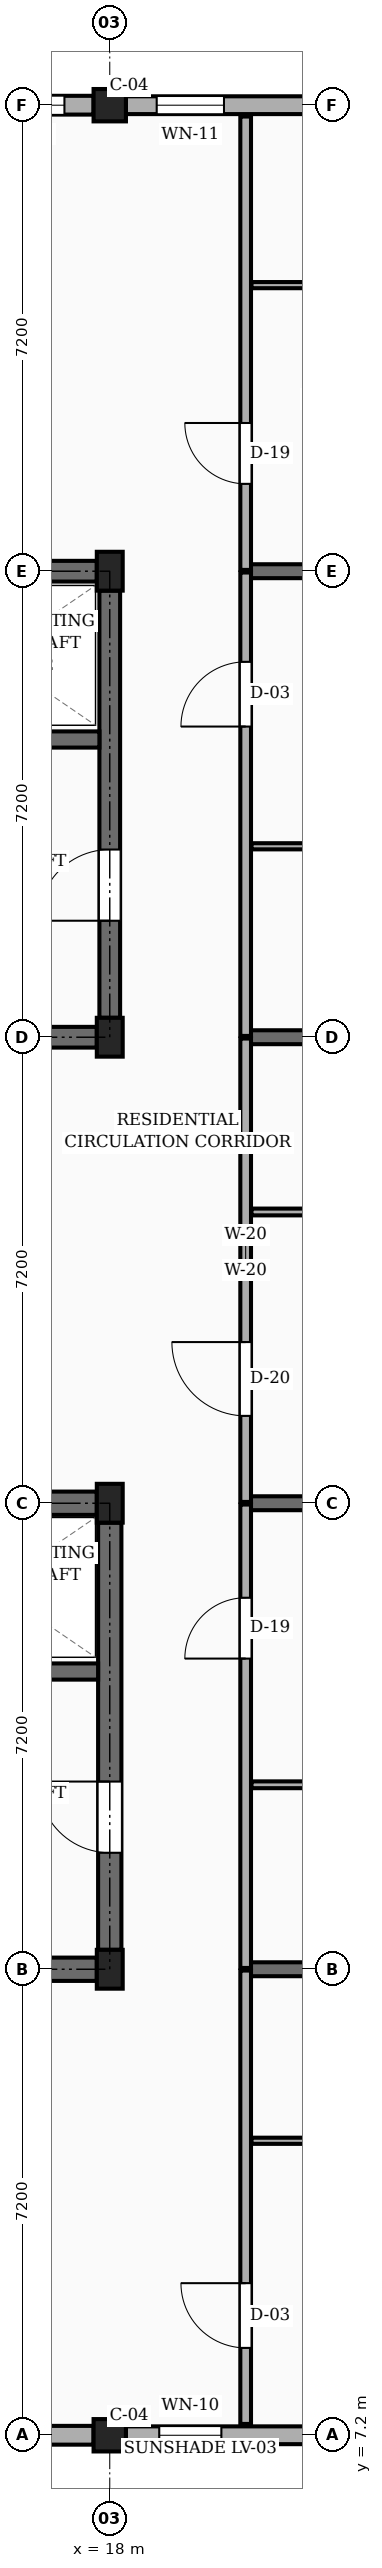
"""IFC4 building model, lengths in metres.
Left out: names, types, materials, properties, quantities, classifications, styles, units other than length and angle.
Written with IfcOpenShell. Run it as: python <this file> out.ifc"""

import sys

from ifc_helpers import new_model, si_unit, direction, frame, frame_2d, origin, origin_2d, place, context, subcontext, project, spatial, rectangle, extrude, element, fill, save


model = new_model("IFC4")
c1 = context("Model", 3, precision=1e-05, world=origin(), true_north=direction((0.0, 1.0)))
c2 = subcontext(c1, "Body", "Model", "MODEL_VIEW")
j1 = project(units=[si_unit("LENGTHUNIT", "METRE"), si_unit("PLANEANGLEUNIT", "RADIAN")], contexts=[c1])
p1 = place(None, origin())
s1 = spatial("IfcSite", under=j1, at=p1, CompositionType="ELEMENT")
p2 = place(p1, origin())
s2 = spatial("IfcBuilding", under=s1, at=p2, CompositionType="ELEMENT")
p3 = place(p2, frame((0.0, 0.0, 29.7)))
s3 = spatial("IfcBuildingStorey", under=s2, at=p3, CompositionType="ELEMENT", Elevation=29.7)
p4 = place(p3, frame((18.0, 7.2, 0.0), z_axis=(0.0, 0.0, 1.0), x_axis=(1.0, 0.0, 0.0)))
e1 = element("IfcColumn", 1, at=p4, inside=s3, PredefinedType="COLUMN", context=c2, shape_type="SweptSolid", body=[
    extrude(rectangle(XDim=0.5, YDim=0.5, at=origin_2d()), origin(), (0.0, 0.0, 1.0), 3.15),
])
for number, where, z_axis, x_axis in (
    (2, (18.0, 14.4, 0.0), (0.0, 0.0, 1.0), (1.0, 0.0, 0.0)),
    (3, (18.0, 21.6, 0.0), (0.0, 0.0, 1.0), (1.0, 0.0, 0.0)),
    (4, (18.0, 28.8, 0.0), (0.0, 0.0, 1.0), (1.0, 0.0, 0.0)),
    (5, (18.0, 36.0, 0.0), (0.0, 0.0, 1.0), (1.0, 0.0, 0.0)),
):
    element("IfcColumn", number, at=place(p3, frame(where, z_axis=z_axis, x_axis=x_axis)), inside=s3, PredefinedType="COLUMN", context=c2, shape_type="SweptSolid", body=[
        extrude(rectangle(XDim=0.4, YDim=0.6, at=origin_2d()), origin(), (0.0, 0.0, 1.0), 3.15),
    ])
p5 = place(p3, frame((18.0, 43.2, 0.0), z_axis=(0.0, 0.0, 1.0), x_axis=(1.0, 0.0, 0.0)))
e6 = element("IfcColumn", 6, at=p5, inside=s3, PredefinedType="COLUMN", context=c2, shape_type="SweptSolid", body=[
    extrude(rectangle(XDim=0.5, YDim=0.5, at=origin_2d()), origin(), (0.0, 0.0, 1.0), 3.15),
])
for number, where, z_axis, x_axis in (
    (7, (20.1, 14.4, 0.0), (0.0, 0.0, 1.0), (1.0, 0.0, 0.0)),
    (8, (20.1, 21.6, 0.0), (0.0, 0.0, 1.0), (1.0, 0.0, 0.0)),
    (9, (20.1, 28.8, 0.0), (0.0, 0.0, 1.0), (1.0, 0.0, 0.0)),
    (10, (20.1, 36.0, 0.0), (0.0, 0.0, 1.0), (1.0, 0.0, 0.0)),
):
    element("IfcWall", number, at=place(p3, frame(where, z_axis=z_axis, x_axis=x_axis)), inside=s3, PredefinedType="SOLIDWALL", context=c2, shape_type="SweptSolid", body=[
        extrude(rectangle(XDim=12.05, YDim=0.215, at=frame_2d((6.025, 0.0))), origin(), (0.0, 0.0, 1.0), 2.17),
    ])
p6 = place(p3, frame((11.05, 7.2, 0.0), z_axis=(0.0, 0.0, 1.0), x_axis=(1.0, 0.0, 0.0)))
e11 = element("IfcWall", 11, at=p6, inside=s3, PredefinedType="SOLIDWALL", context=c2, shape_type="SweptSolid", body=[
    extrude(rectangle(XDim=6.7, YDim=0.29, at=frame_2d((3.35, 0.0))), origin(), (0.0, 0.0, 1.0), 2.44),
])
p7 = place(p6, frame((0.45, 0.0, 0.78)))
e12 = element("IfcOpeningElement", 12, at=p7, cuts=e11, PredefinedType="OPENING", context=c2, shape_type="SweptSolid", body=[
    extrude(rectangle(XDim=1.4, YDim=1.15, at=frame_2d((0.7, 0.575))), frame((0.0, 0.155, 0.0), z_axis=(0.0, -1.0, 0.0), x_axis=(1.0, 0.0, 0.0)), (0.0, 0.0, 1.0), 0.31),
])
p8 = place(p6, frame((4.65, 0.0, 0.78)))
e13 = element("IfcOpeningElement", 13, at=p8, cuts=e11, PredefinedType="OPENING", context=c2, shape_type="SweptSolid", body=[
    extrude(rectangle(XDim=0.96, YDim=1.26, at=frame_2d((0.48, 0.63))), frame((0.0, 0.155, 0.0), z_axis=(0.0, -1.0, 0.0), x_axis=(1.0, 0.0, 0.0)), (0.0, 0.0, 1.0), 0.31),
])
p9 = place(p3, frame((18.25, 7.2, 0.0), z_axis=(0.0, 0.0, 1.0), x_axis=(1.0, 0.0, 0.0)))
e14 = element("IfcWall", 14, at=p9, inside=s3, PredefinedType="SOLIDWALL", context=c2, shape_type="SweptSolid", body=[
    extrude(rectangle(XDim=6.7, YDim=0.275, at=frame_2d((3.35, 0.0))), origin(), (0.0, 0.0, 1.0), 2.44),
])
p10 = place(p9, frame((0.515, 0.0, 0.78)))
e15 = element("IfcOpeningElement", 15, at=p10, cuts=e14, PredefinedType="OPENING", context=c2, shape_type="SweptSolid", body=[
    extrude(rectangle(XDim=0.96, YDim=1.26, at=frame_2d((0.48, 0.63))), frame((0.0, 0.147, 0.0), z_axis=(0.0, -1.0, 0.0), x_axis=(1.0, 0.0, 0.0)), (0.0, 0.0, 1.0), 0.295),
])
p11 = place(p9, frame((2.93, 0.0, 0.78)))
e16 = element("IfcOpeningElement", 16, at=p11, cuts=e14, PredefinedType="OPENING", context=c2, shape_type="SweptSolid", body=[
    extrude(rectangle(XDim=1.12, YDim=1.26, at=frame_2d((0.56, 0.63))), frame((0.0, 0.147, 0.0), z_axis=(0.0, -1.0, 0.0), x_axis=(1.0, 0.0, 0.0)), (0.0, 0.0, 1.0), 0.295),
])
p12 = place(p9, frame((5.405, 0.0, 0.78)))
e17 = element("IfcOpeningElement", 17, at=p12, cuts=e14, PredefinedType="OPENING", context=c2, shape_type="SweptSolid", body=[
    extrude(rectangle(XDim=0.88, YDim=1.26, at=frame_2d((0.44, 0.63))), frame((0.0, 0.147, 0.0), z_axis=(0.0, -1.0, 0.0), x_axis=(1.0, 0.0, 0.0)), (0.0, 0.0, 1.0), 0.295),
])
p13 = place(p3, frame((24.95, 43.2, 0.0), z_axis=(0.0, 0.0, 1.0), x_axis=(-1.0, 0.0, 0.0)))
e18 = element("IfcWall", 18, at=p13, inside=s3, PredefinedType="SOLIDWALL", context=c2, shape_type="SweptSolid", body=[
    extrude(rectangle(XDim=6.7, YDim=0.275, at=frame_2d((3.35, 0.0))), origin(), (0.0, 0.0, 1.0), 2.44),
])
p14 = place(p13, frame((0.495, 0.0, 0.78)))
e19 = element("IfcOpeningElement", 19, at=p14, cuts=e18, PredefinedType="OPENING", context=c2, shape_type="SweptSolid", body=[
    extrude(rectangle(XDim=0.94, YDim=1.44, at=frame_2d((0.47, 0.72))), frame((0.0, 0.147, 0.0), z_axis=(0.0, -1.0, 0.0), x_axis=(1.0, 0.0, 0.0)), (0.0, 0.0, 1.0), 0.295),
])
p15 = place(p13, frame((2.745, 0.0, 0.78)))
e20 = element("IfcOpeningElement", 20, at=p15, cuts=e18, PredefinedType="OPENING", context=c2, shape_type="SweptSolid", body=[
    extrude(rectangle(XDim=1.15, YDim=1.44, at=frame_2d((0.575, 0.72))), frame((0.0, 0.147, 0.0), z_axis=(0.0, -1.0, 0.0), x_axis=(1.0, 0.0, 0.0)), (0.0, 0.0, 1.0), 0.295),
])
p16 = place(p13, frame((5.185, 0.0, 0.78)))
e21 = element("IfcOpeningElement", 21, at=p16, cuts=e18, PredefinedType="OPENING", context=c2, shape_type="SweptSolid", body=[
    extrude(rectangle(XDim=1.04, YDim=1.26, at=frame_2d((0.52, 0.63))), frame((0.0, 0.147, 0.0), z_axis=(0.0, -1.0, 0.0), x_axis=(1.0, 0.0, 0.0)), (0.0, 0.0, 1.0), 0.295),
])
p17 = place(p3, frame((17.75, 43.2, 0.0), z_axis=(0.0, 0.0, 1.0), x_axis=(-1.0, 0.0, 0.0)))
e22 = element("IfcWall", 22, at=p17, inside=s3, PredefinedType="SOLIDWALL", context=c2, shape_type="SweptSolid", body=[
    extrude(rectangle(XDim=6.7, YDim=0.29, at=frame_2d((3.35, 0.0))), origin(), (0.0, 0.0, 1.0), 2.44),
])
p18 = place(p17, frame((0.45, 0.0, 0.78)))
e23 = element("IfcOpeningElement", 23, at=p18, cuts=e22, PredefinedType="OPENING", context=c2, shape_type="SweptSolid", body=[
    extrude(rectangle(XDim=1.25, YDim=1.44, at=frame_2d((0.625, 0.72))), frame((0.0, 0.155, 0.0), z_axis=(0.0, -1.0, 0.0), x_axis=(1.0, 0.0, 0.0)), (0.0, 0.0, 1.0), 0.31),
])
p19 = place(p17, frame((4.65, 0.0, 0.78)))
e24 = element("IfcOpeningElement", 24, at=p19, cuts=e22, PredefinedType="OPENING", context=c2, shape_type="SweptSolid", body=[
    extrude(rectangle(XDim=1.45, YDim=1.44, at=frame_2d((0.725, 0.72))), frame((0.0, 0.155, 0.0), z_axis=(0.0, -1.0, 0.0), x_axis=(1.0, 0.0, 0.0)), (0.0, 0.0, 1.0), 0.31),
])
p20 = place(p3, frame((11.0, 21.6, 0.0), z_axis=(0.0, 0.0, 1.0), x_axis=(1.0, 0.0, 0.0)))
e25 = element("IfcWall", 25, at=p20, inside=s3, PredefinedType="SHEAR", context=c2, shape_type="SweptSolid", body=[
    extrude(rectangle(XDim=6.8, YDim=0.36, at=frame_2d((3.4, 0.0))), origin(), (0.0, 0.0, 1.0), 2.87),
])
p21 = place(p3, frame((18.0, 14.7, 0.0), z_axis=(0.0, 0.0, 1.0), x_axis=(0.0, 1.0, 0.0)))
e26 = element("IfcWall", 26, at=p21, inside=s3, PredefinedType="SHEAR", context=c2, shape_type="SweptSolid", body=[
    extrude(rectangle(XDim=6.6, YDim=0.36, at=frame_2d((3.3, 0.0))), origin(), (0.0, 0.0, 1.0), 2.87),
])
p22 = place(p21, frame((1.5, 0.0, 0.0)))
e27 = element("IfcOpeningElement", 27, at=p22, cuts=e26, PredefinedType="OPENING", context=c2, shape_type="SweptSolid", body=[
    extrude(rectangle(XDim=1.1, YDim=2.15, at=frame_2d((0.55, 1.075))), frame((0.0, 0.19, 0.0), z_axis=(0.0, -1.0, 0.0), x_axis=(1.0, 0.0, 0.0)), (0.0, 0.0, 1.0), 0.38),
])
p23 = place(p3, frame((11.0, 14.4, 0.0), z_axis=(0.0, 0.0, 1.0), x_axis=(1.0, 0.0, 0.0)))
e28 = element("IfcWall", 28, at=p23, inside=s3, PredefinedType="SHEAR", context=c2, shape_type="SweptSolid", body=[
    extrude(rectangle(XDim=6.8, YDim=0.36, at=frame_2d((3.4, 0.0))), origin(), (0.0, 0.0, 1.0), 2.87),
])
p24 = place(p3, frame((14.525, 19.0, 0.0), z_axis=(0.0, 0.0, 1.0), x_axis=(1.0, 0.0, 0.0)))
e29 = element("IfcWall", 29, at=p24, inside=s3, PredefinedType="SHEAR", context=c2, shape_type="SweptSolid", body=[
    extrude(rectangle(XDim=3.295, YDim=0.25, at=frame_2d((1.647, 0.0))), origin(), (0.0, 0.0, 1.0), 2.87),
])
p25 = place(p24, frame((1.1, 0.0, 0.0)))
e30 = element("IfcOpeningElement", 30, at=p25, cuts=e29, PredefinedType="OPENING", context=c2, shape_type="SweptSolid", body=[
    extrude(rectangle(XDim=1.1, YDim=2.2, at=frame_2d((0.55, 1.1))), frame((0.0, 0.135, 0.0), z_axis=(0.0, -1.0, 0.0), x_axis=(1.0, 0.0, 0.0)), (0.0, 0.0, 1.0), 0.27),
])
p26 = place(p3, frame((11.0, 36.0, 0.0), z_axis=(0.0, 0.0, 1.0), x_axis=(1.0, 0.0, 0.0)))
e31 = element("IfcWall", 31, at=p26, inside=s3, PredefinedType="SHEAR", context=c2, shape_type="SweptSolid", body=[
    extrude(rectangle(XDim=6.8, YDim=0.32, at=frame_2d((3.4, 0.0))), origin(), (0.0, 0.0, 1.0), 2.87),
])
p27 = place(p3, frame((18.0, 29.1, 0.0), z_axis=(0.0, 0.0, 1.0), x_axis=(0.0, 1.0, 0.0)))
e32 = element("IfcWall", 32, at=p27, inside=s3, PredefinedType="SHEAR", context=c2, shape_type="SweptSolid", body=[
    extrude(rectangle(XDim=6.6, YDim=0.32, at=frame_2d((3.3, 0.0))), origin(), (0.0, 0.0, 1.0), 2.87),
])
p28 = place(p27, frame((1.5, 0.0, 0.0)))
e33 = element("IfcOpeningElement", 33, at=p28, cuts=e32, PredefinedType="OPENING", context=c2, shape_type="SweptSolid", body=[
    extrude(rectangle(XDim=1.1, YDim=2.15, at=frame_2d((0.55, 1.075))), frame((0.0, 0.17, 0.0), z_axis=(0.0, -1.0, 0.0), x_axis=(1.0, 0.0, 0.0)), (0.0, 0.0, 1.0), 0.34),
])
p29 = place(p3, frame((11.0, 28.8, 0.0), z_axis=(0.0, 0.0, 1.0), x_axis=(1.0, 0.0, 0.0)))
e34 = element("IfcWall", 34, at=p29, inside=s3, PredefinedType="SHEAR", context=c2, shape_type="SweptSolid", body=[
    extrude(rectangle(XDim=6.8, YDim=0.32, at=frame_2d((3.4, 0.0))), origin(), (0.0, 0.0, 1.0), 2.87),
])
p30 = place(p3, frame((14.525, 33.4, 0.0), z_axis=(0.0, 0.0, 1.0), x_axis=(1.0, 0.0, 0.0)))
e35 = element("IfcWall", 35, at=p30, inside=s3, PredefinedType="SHEAR", context=c2, shape_type="SweptSolid", body=[
    extrude(rectangle(XDim=3.315, YDim=0.25, at=frame_2d((1.658, 0.0))), origin(), (0.0, 0.0, 1.0), 2.87),
])
p31 = place(p30, frame((1.1, 0.0, 0.0)))
e36 = element("IfcOpeningElement", 36, at=p31, cuts=e35, PredefinedType="OPENING", context=c2, shape_type="SweptSolid", body=[
    extrude(rectangle(XDim=1.1, YDim=2.2, at=frame_2d((0.55, 1.1))), frame((0.0, 0.135, 0.0), z_axis=(0.0, -1.0, 0.0), x_axis=(1.0, 0.0, 0.0)), (0.0, 0.0, 1.0), 0.27),
])
p32 = place(p3, frame((20.1, 7.375, 0.0), z_axis=(0.0, 0.0, 1.0), x_axis=(0.0, 1.0, 0.0)))
e37 = element("IfcWall", 37, at=p32, inside=s3, PredefinedType="PARTITIONING", context=c2, shape_type="SweptSolid", body=[
    extrude(rectangle(XDim=7.005, YDim=0.165, at=frame_2d((3.502, 0.0))), origin(), (0.0, 0.0, 1.0), 2.305),
])
p33 = place(p32, frame((1.175, 0.0, 0.0)))
e38 = element("IfcOpeningElement", 38, at=p33, cuts=e37, PredefinedType="OPENING", context=c2, shape_type="SweptSolid", body=[
    extrude(rectangle(XDim=1.0, YDim=2.15, at=frame_2d((0.5, 1.075))), frame((0.0, 0.093, 0.0), z_axis=(0.0, -1.0, 0.0), x_axis=(1.0, 0.0, 0.0)), (0.0, 0.0, 1.0), 0.185),
])
p34 = place(p3, frame((20.1, 14.42, 0.0), z_axis=(0.0, 0.0, 1.0), x_axis=(0.0, 1.0, 0.0)))
e39 = element("IfcWall", 39, at=p34, inside=s3, PredefinedType="PARTITIONING", context=c2, shape_type="SweptSolid", body=[
    extrude(rectangle(XDim=7.16, YDim=0.165, at=frame_2d((3.58, 0.0))), origin(), (0.0, 0.0, 1.0), 2.305),
])
p35 = place(p34, frame((4.78, 0.0, 0.0)))
e40 = element("IfcOpeningElement", 40, at=p35, cuts=e39, PredefinedType="OPENING", context=c2, shape_type="SweptSolid", body=[
    extrude(rectangle(XDim=0.94, YDim=2.12, at=frame_2d((0.47, 1.06))), frame((0.0, 0.093, 0.0), z_axis=(0.0, -1.0, 0.0), x_axis=(1.0, 0.0, 0.0)), (0.0, 0.0, 1.0), 0.185),
])
p36 = place(p3, frame((20.1, 21.62, 0.0), z_axis=(0.0, 0.0, 1.0), x_axis=(0.0, 1.0, 0.0)))
e41 = element("IfcWall", 41, at=p36, inside=s3, PredefinedType="PARTITIONING", context=c2, shape_type="SweptSolid", body=[
    extrude(rectangle(XDim=7.16, YDim=0.165, at=frame_2d((3.58, 0.0))), origin(), (0.0, 0.0, 1.0), 2.305),
])
p37 = place(p36, frame((1.33, 0.0, 0.0)))
e42 = element("IfcOpeningElement", 42, at=p37, cuts=e41, PredefinedType="OPENING", context=c2, shape_type="SweptSolid", body=[
    extrude(rectangle(XDim=1.14, YDim=2.18, at=frame_2d((0.57, 1.09))), frame((0.0, 0.093, 0.0), z_axis=(0.0, -1.0, 0.0), x_axis=(1.0, 0.0, 0.0)), (0.0, 0.0, 1.0), 0.185),
])
p38 = place(p3, frame((20.1, 28.82, 0.0), z_axis=(0.0, 0.0, 1.0), x_axis=(0.0, 1.0, 0.0)))
e43 = element("IfcWall", 43, at=p38, inside=s3, PredefinedType="PARTITIONING", context=c2, shape_type="SweptSolid", body=[
    extrude(rectangle(XDim=7.16, YDim=0.165, at=frame_2d((3.58, 0.0))), origin(), (0.0, 0.0, 1.0), 2.305),
])
p39 = place(p38, frame((4.78, 0.0, 0.0)))
e44 = element("IfcOpeningElement", 44, at=p39, cuts=e43, PredefinedType="OPENING", context=c2, shape_type="SweptSolid", body=[
    extrude(rectangle(XDim=1.0, YDim=2.15, at=frame_2d((0.5, 1.075))), frame((0.0, 0.093, 0.0), z_axis=(0.0, -1.0, 0.0), x_axis=(1.0, 0.0, 0.0)), (0.0, 0.0, 1.0), 0.185),
])
p40 = place(p3, frame((20.1, 36.02, 0.0), z_axis=(0.0, 0.0, 1.0), x_axis=(0.0, 1.0, 0.0)))
e45 = element("IfcWall", 45, at=p40, inside=s3, PredefinedType="PARTITIONING", context=c2, shape_type="SweptSolid", body=[
    extrude(rectangle(XDim=7.005, YDim=0.165, at=frame_2d((3.502, 0.0))), origin(), (0.0, 0.0, 1.0), 2.305),
])
p41 = place(p40, frame((1.33, 0.0, 0.0)))
e46 = element("IfcOpeningElement", 46, at=p41, cuts=e45, PredefinedType="OPENING", context=c2, shape_type="SweptSolid", body=[
    extrude(rectangle(XDim=0.94, YDim=2.12, at=frame_2d((0.47, 1.06))), frame((0.0, 0.093, 0.0), z_axis=(0.0, -1.0, 0.0), x_axis=(1.0, 0.0, 0.0)), (0.0, 0.0, 1.0), 0.185),
])
p42 = place(p3, frame((20.19, 11.75, 0.0), z_axis=(0.0, 0.0, 1.0), x_axis=(1.0, 0.0, 0.0)))
e47 = element("IfcWall", 47, at=p42, inside=s3, PredefinedType="PARTITIONING", context=c2, shape_type="SweptSolid", body=[
    extrude(rectangle(XDim=3.12, YDim=0.095, at=frame_2d((1.56, 0.0))), origin(), (0.0, 0.0, 1.0), 2.305),
])
p43 = place(p42, frame((1.11, 0.0, 0.0)))
e48 = element("IfcOpeningElement", 48, at=p43, cuts=e47, PredefinedType="OPENING", context=c2, shape_type="SweptSolid", body=[
    extrude(rectangle(XDim=0.9, YDim=2.05, at=frame_2d((0.45, 1.025))), frame((0.0, 0.058, 0.0), z_axis=(0.0, -1.0, 0.0), x_axis=(1.0, 0.0, 0.0)), (0.0, 0.0, 1.0), 0.115),
])
p44 = place(p3, frame((20.19, 17.25, 0.0), z_axis=(0.0, 0.0, 1.0), x_axis=(1.0, 0.0, 0.0)))
e49 = element("IfcWall", 49, at=p44, inside=s3, PredefinedType="PARTITIONING", context=c2, shape_type="SweptSolid", body=[
    extrude(rectangle(XDim=4.14, YDim=0.105, at=frame_2d((2.07, 0.0))), origin(), (0.0, 0.0, 1.0), 2.305),
])
p45 = place(p44, frame((1.62, 0.0, 0.0)))
e50 = element("IfcOpeningElement", 50, at=p45, cuts=e49, PredefinedType="OPENING", context=c2, shape_type="SweptSolid", body=[
    extrude(rectangle(XDim=0.9, YDim=2.05, at=frame_2d((0.45, 1.025))), frame((0.0, 0.062, 0.0), z_axis=(0.0, -1.0, 0.0), x_axis=(1.0, 0.0, 0.0)), (0.0, 0.0, 1.0), 0.125),
])
p46 = place(p3, frame((20.19, 26.1, 0.0), z_axis=(0.0, 0.0, 1.0), x_axis=(1.0, 0.0, 0.0)))
e51 = element("IfcWall", 51, at=p46, inside=s3, PredefinedType="PARTITIONING", context=c2, shape_type="SweptSolid", body=[
    extrude(rectangle(XDim=3.02, YDim=0.105, at=frame_2d((1.51, 0.0))), origin(), (0.0, 0.0, 1.0), 2.305),
])
p47 = place(p46, frame((1.075, 0.0, 0.0)))
e52 = element("IfcOpeningElement", 52, at=p47, cuts=e51, PredefinedType="OPENING", context=c2, shape_type="SweptSolid", body=[
    extrude(rectangle(XDim=0.87, YDim=2.05, at=frame_2d((0.435, 1.025))), frame((0.0, 0.062, 0.0), z_axis=(0.0, -1.0, 0.0), x_axis=(1.0, 0.0, 0.0)), (0.0, 0.0, 1.0), 0.125),
])
p48 = place(p3, frame((20.19, 31.75, 0.0), z_axis=(0.0, 0.0, 1.0), x_axis=(1.0, 0.0, 0.0)))
e53 = element("IfcWall", 53, at=p48, inside=s3, PredefinedType="PARTITIONING", context=c2, shape_type="SweptSolid", body=[
    extrude(rectangle(XDim=4.59, YDim=0.095, at=frame_2d((2.295, 0.0))), origin(), (0.0, 0.0, 1.0), 2.305),
])
p49 = place(p48, frame((1.845, 0.0, 0.0)))
e54 = element("IfcOpeningElement", 54, at=p49, cuts=e53, PredefinedType="OPENING", context=c2, shape_type="SweptSolid", body=[
    extrude(rectangle(XDim=0.9, YDim=2.05, at=frame_2d((0.45, 1.025))), frame((0.0, 0.058, 0.0), z_axis=(0.0, -1.0, 0.0), x_axis=(1.0, 0.0, 0.0)), (0.0, 0.0, 1.0), 0.115),
])
p50 = place(p3, frame((20.19, 40.42, 0.0), z_axis=(0.0, 0.0, 1.0), x_axis=(1.0, 0.0, 0.0)))
e55 = element("IfcWall", 55, at=p50, inside=s3, PredefinedType="PARTITIONING", context=c2, shape_type="SweptSolid", body=[
    extrude(rectangle(XDim=2.9, YDim=0.095, at=frame_2d((1.45, 0.0))), origin(), (0.0, 0.0, 1.0), 2.305),
])
p51 = place(p50, frame((1.015, 0.0, 0.0)))
e56 = element("IfcOpeningElement", 56, at=p51, cuts=e55, PredefinedType="OPENING", context=c2, shape_type="SweptSolid", body=[
    extrude(rectangle(XDim=0.87, YDim=2.05, at=frame_2d((0.435, 1.025))), frame((0.0, 0.058, 0.0), z_axis=(0.0, -1.0, 0.0), x_axis=(1.0, 0.0, 0.0)), (0.0, 0.0, 1.0), 0.115),
])
p52 = place(p10, origin())
e57 = element("IfcWindow", 57, at=p52, inside=s3, PartitioningType="SINGLE_PANEL", PredefinedType="WINDOW", context=c2, shape_type="SweptSolid", body=[
    extrude(rectangle(XDim=0.96, YDim=1.26, at=frame_2d((0.48, 0.63))), frame((0.0, 0.03, 0.0), z_axis=(0.0, -1.0, 0.0), x_axis=(1.0, 0.0, 0.0)), (0.0, 0.0, 1.0), 0.06),
])
fill(e15, e57)
p53 = place(p16, origin())
e58 = element("IfcWindow", 58, at=p53, inside=s3, PartitioningType="SINGLE_PANEL", PredefinedType="WINDOW", context=c2, shape_type="SweptSolid", body=[
    extrude(rectangle(XDim=1.04, YDim=1.26, at=frame_2d((0.52, 0.63))), frame((0.0, 0.03, 0.0), z_axis=(0.0, -1.0, 0.0), x_axis=(1.0, 0.0, 0.0)), (0.0, 0.0, 1.0), 0.06),
])
fill(e21, e58)
p54 = place(p18, origin())
e59 = element("IfcWindow", 59, at=p54, inside=s3, PartitioningType="SINGLE_PANEL", PredefinedType="WINDOW", context=c2, shape_type="SweptSolid", body=[
    extrude(rectangle(XDim=1.25, YDim=1.44, at=frame_2d((0.625, 0.72))), frame((0.0, 0.03, 0.0), z_axis=(0.0, -1.0, 0.0), x_axis=(1.0, 0.0, 0.0)), (0.0, 0.0, 1.0), 0.06),
])
fill(e23, e59)
p55 = place(p22, frame((1.1, 0.0, 0.0), z_axis=(0.0, 0.0, 1.0), x_axis=(-1.0, 0.0, 0.0)))
e60 = element("IfcDoor", 60, at=p55, inside=s3, OperationType="SINGLE_SWING_RIGHT", PredefinedType="DOOR", context=c2, shape_type="SweptSolid", body=[
    extrude(rectangle(XDim=1.1, YDim=2.15, at=frame_2d((0.55, 1.075))), frame((0.0, 0.025, 0.0), z_axis=(0.0, -1.0, 0.0), x_axis=(1.0, 0.0, 0.0)), (0.0, 0.0, 1.0), 0.05),
])
fill(e27, e60)
p56 = place(p28, frame((1.1, 0.0, 0.0), z_axis=(0.0, 0.0, 1.0), x_axis=(-1.0, 0.0, 0.0)))
e61 = element("IfcDoor", 61, at=p56, inside=s3, OperationType="SINGLE_SWING_LEFT", PredefinedType="DOOR", context=c2, shape_type="SweptSolid", body=[
    extrude(rectangle(XDim=1.1, YDim=2.15, at=frame_2d((0.55, 1.075))), frame((0.0, 0.025, 0.0), z_axis=(0.0, -1.0, 0.0), x_axis=(1.0, 0.0, 0.0)), (0.0, 0.0, 1.0), 0.05),
])
fill(e33, e61)
p57 = place(p33, origin())
e62 = element("IfcDoor", 62, at=p57, inside=s3, OperationType="SINGLE_SWING_RIGHT", PredefinedType="DOOR", context=c2, shape_type="SweptSolid", body=[
    extrude(rectangle(XDim=1.0, YDim=2.15, at=frame_2d((0.5, 1.075))), frame((0.0, 0.025, 0.0), z_axis=(0.0, -1.0, 0.0), x_axis=(1.0, 0.0, 0.0)), (0.0, 0.0, 1.0), 0.05),
])
fill(e38, e62)
p58 = place(p35, origin())
e63 = element("IfcDoor", 63, at=p58, inside=s3, OperationType="SINGLE_SWING_LEFT", PredefinedType="DOOR", context=c2, shape_type="SweptSolid", body=[
    extrude(rectangle(XDim=0.94, YDim=2.12, at=frame_2d((0.47, 1.06))), frame((0.0, 0.025, 0.0), z_axis=(0.0, -1.0, 0.0), x_axis=(1.0, 0.0, 0.0)), (0.0, 0.0, 1.0), 0.05),
])
fill(e40, e63)
p59 = place(p37, origin())
e64 = element("IfcDoor", 64, at=p59, inside=s3, OperationType="SINGLE_SWING_RIGHT", PredefinedType="DOOR", context=c2, shape_type="SweptSolid", body=[
    extrude(rectangle(XDim=1.14, YDim=2.18, at=frame_2d((0.57, 1.09))), frame((0.0, 0.025, 0.0), z_axis=(0.0, -1.0, 0.0), x_axis=(1.0, 0.0, 0.0)), (0.0, 0.0, 1.0), 0.05),
])
fill(e42, e64)
p60 = place(p39, origin())
e65 = element("IfcDoor", 65, at=p60, inside=s3, OperationType="SINGLE_SWING_LEFT", PredefinedType="DOOR", context=c2, shape_type="SweptSolid", body=[
    extrude(rectangle(XDim=1.0, YDim=2.15, at=frame_2d((0.5, 1.075))), frame((0.0, 0.025, 0.0), z_axis=(0.0, -1.0, 0.0), x_axis=(1.0, 0.0, 0.0)), (0.0, 0.0, 1.0), 0.05),
])
fill(e44, e65)
p61 = place(p41, origin())
e66 = element("IfcDoor", 66, at=p61, inside=s3, OperationType="SINGLE_SWING_RIGHT", PredefinedType="DOOR", context=c2, shape_type="SweptSolid", body=[
    extrude(rectangle(XDim=0.94, YDim=2.12, at=frame_2d((0.47, 1.06))), frame((0.0, 0.025, 0.0), z_axis=(0.0, -1.0, 0.0), x_axis=(1.0, 0.0, 0.0)), (0.0, 0.0, 1.0), 0.05),
])
fill(e46, e66)
save(model, sys.argv[1])
